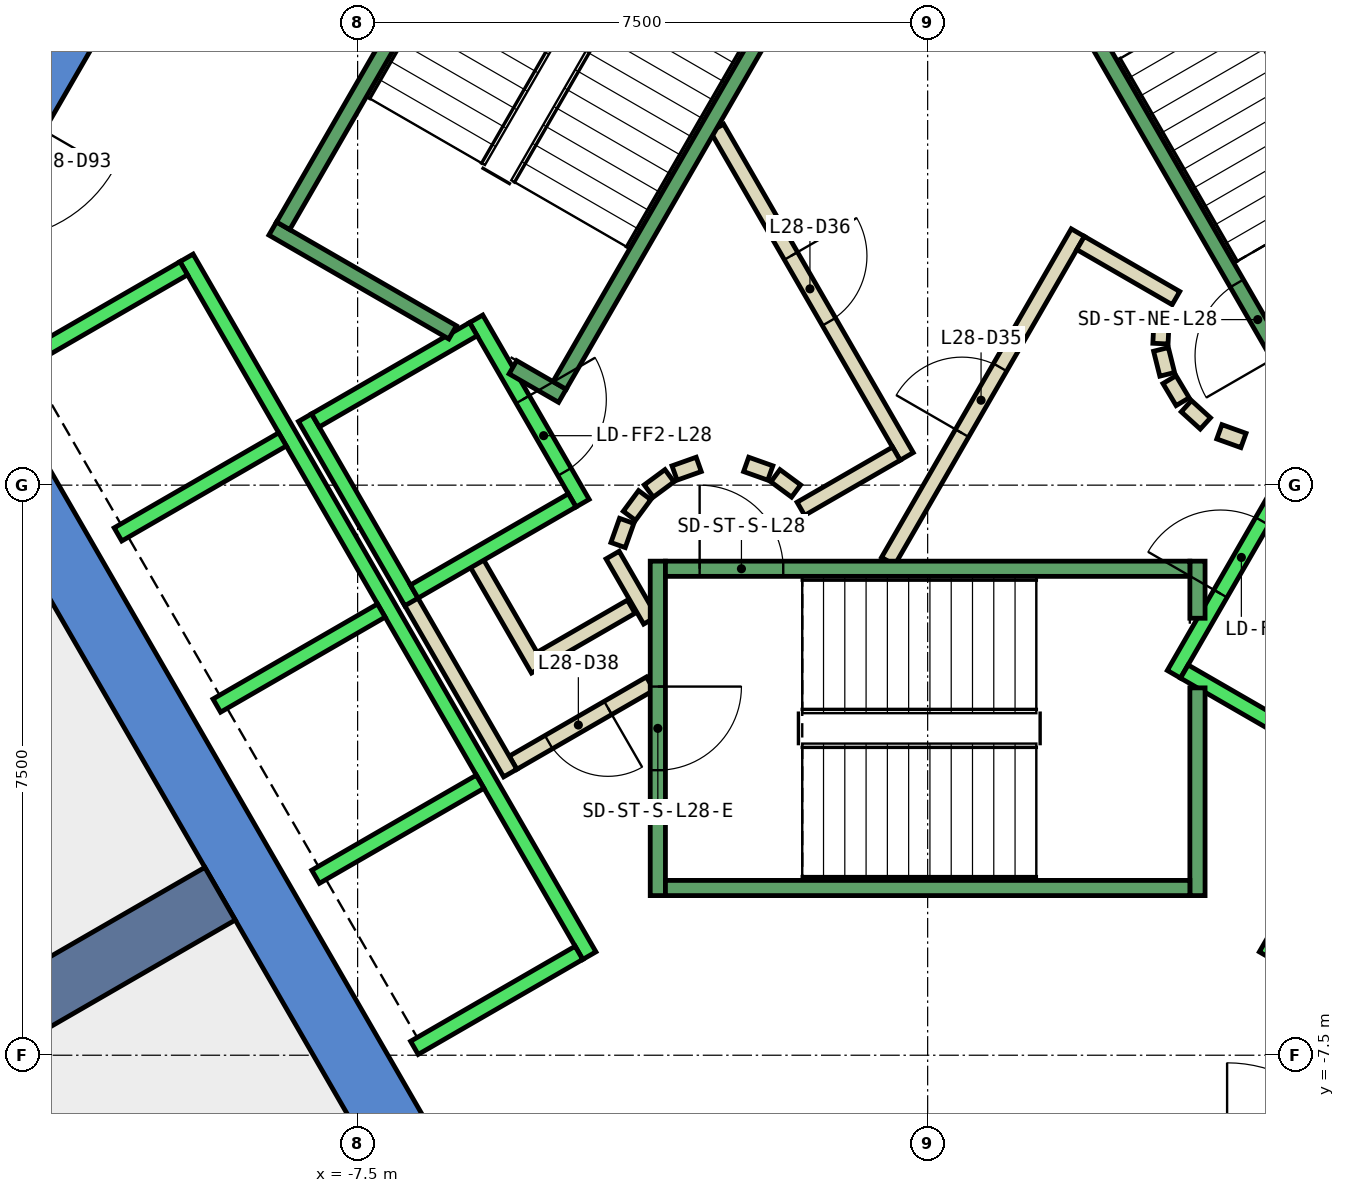
"""IFC4 building model, lengths in metres.
Left out: names, types, materials, properties, quantities, classifications, styles, units other than length and angle.
Written with IfcOpenShell. Run it as: python <this file> out.ifc"""

import sys

from ifc_helpers import new_model, si_unit, direction, frame, frame_2d, origin, place, context, subcontext, project, spatial, polyline, rectangle, outline, extrude, element, fill, save


model = new_model("IFC4")
c1 = context("Model", 3, precision=1e-05, world=origin(), true_north=direction((0.0, 1.0)))
c2 = subcontext(c1, "Body", "Model", "MODEL_VIEW")
j1 = project(units=[si_unit("LENGTHUNIT", "METRE"), si_unit("PLANEANGLEUNIT", "RADIAN")], contexts=[c1])
p1 = place(None, origin())
s1 = spatial("IfcSite", under=j1, at=p1, CompositionType="ELEMENT")
p2 = place(p1, origin())
s2 = spatial("IfcBuilding", under=s1, at=p2, CompositionType="ELEMENT")
p3 = place(p2, frame((0.0, 0.0, 128.6)))
s3 = spatial("IfcBuildingStorey", under=s2, at=p3, CompositionType="ELEMENT", Elevation=128.6)
p4 = place(p3, frame((0.0, 0.0, -0.4)))
e1 = element("IfcWall", 1, at=p4, inside=s3, PredefinedType="SHEAR", context=c2, shape_type="SweptSolid", body=[
    extrude(outline(polyline([(-12.267, 5.252), (-11.531, 4.827), (-6.437, 13.65), (-6.928, 14.5), (-12.267, 5.252)])), origin(), (0.0, 0.0, 1.0), 4.0),
])
p5 = place(p3, frame((0.0, 0.0, -0.4)))
e2 = element("IfcWall", 2, at=p5, inside=s3, PredefinedType="SHEAR", context=c2, shape_type="SweptSolid", body=[
    extrude(outline(polyline([(-13.856, 2.5), (-6.928, -9.5), (-6.437, -8.65), (-12.875, 2.5), (-13.856, 2.5)])), origin(), (0.0, 0.0, 1.0), 4.0),
])
p6 = place(p3, frame((-9.31, -5.375, -0.4), z_axis=(0.0, 0.0, 1.0), x_axis=(-0.866017533419, -0.500013631625, 0.0)))
e3 = element("IfcWall", 3, at=p6, inside=s3, PredefinedType="SHEAR", context=c2, shape_type="SweptSolid", body=[
    extrude(rectangle(XDim=9.0, YDim=0.8, at=frame_2d((4.5, 0.0))), origin(), (0.0, 0.0, 1.0), 4.0),
])
p7 = place(p3, frame((-3.9, -1.599, 0.0), z_axis=(0.0, 0.0, 1.0), x_axis=(-0.865969445389, -0.500096910261, 0.0)))
e4 = element("IfcWall", 4, at=p7, inside=s3, PredefinedType="PARTITIONING", context=c2, shape_type="SweptSolid", body=[
    extrude(rectangle(XDim=1.373, YDim=0.2, at=frame_2d((0.687, 0.0))), origin(), (0.0, 0.0, 1.0), 3.6),
])
p8 = place(p3, frame((-5.126, -2.422, 0.0), z_axis=(0.0, 0.0, 1.0), x_axis=(-0.500062241894, 0.865989465428, 0.0)))
e5 = element("IfcWall", 5, at=p8, inside=s3, PredefinedType="PARTITIONING", context=c2, shape_type="SweptSolid", body=[
    extrude(rectangle(XDim=1.7, YDim=0.2, at=frame_2d((0.85, 0.0))), origin(), (0.0, 0.0, 1.0), 3.6),
])
p9 = place(p3, frame((-3.65, -2.61, 0.0), z_axis=(0.0, 0.0, 1.0), x_axis=(-0.866072462134, -0.499918483688, 0.0)))
e6 = element("IfcWall", 6, at=p9, inside=s3, PredefinedType="PARTITIONING", context=c2, shape_type="SweptSolid", body=[
    extrude(rectangle(XDim=2.084, YDim=0.2, at=frame_2d((1.042, 0.0))), origin(), (0.0, 0.0, 1.0), 3.6),
])
p10 = place(p9, frame((0.642, 0.0, 0.0)))
e7 = element("IfcOpeningElement", 7, at=p10, cuts=e6, PredefinedType="OPENING", context=c2, shape_type="SweptSolid", body=[
    extrude(rectangle(XDim=0.9, YDim=2.1, at=frame_2d((0.45, 1.05))), frame((0.0, 0.11, 0.0), z_axis=(0.0, -1.0, 0.0), x_axis=(1.0, 0.0, 0.0)), (0.0, 0.0, 1.0), 0.22),
])
p11 = place(p3, frame((-5.492, -3.788, 0.0), z_axis=(0.0, 0.0, 1.0), x_axis=(-0.500008949224, 0.866020236886, 0.0)))
e8 = element("IfcWall", 8, at=p11, inside=s3, PredefinedType="PARTITIONING", context=c2, shape_type="SweptSolid", body=[
    extrude(rectangle(XDim=2.68, YDim=0.2, at=frame_2d((1.34, 0.0))), origin(), (0.0, 0.0, 1.0), 3.6),
])
p12 = place(p3, frame((-4.145, -0.92, 0.0), z_axis=(0.0, 0.0, 1.0), x_axis=(0.499743786207, -0.866173278362, 0.0)))
e9 = element("IfcWall", 9, at=p12, inside=s3, PredefinedType="PARTITIONING", context=c2, shape_type="SweptSolid", body=[
    extrude(rectangle(XDim=0.991, YDim=0.2, at=frame_2d((0.495, 0.0))), origin(), (0.0, 0.0, 1.0), 3.6),
])
p13 = place(p3, frame((-0.52, -1.0, 0.0), z_axis=(0.0, 0.0, 1.0), x_axis=(0.50011622646, 0.865958290007, 0.0)))
e10 = element("IfcWall", 10, at=p13, inside=s3, PredefinedType="PARTITIONING", context=c2, shape_type="SweptSolid", body=[
    extrude(rectangle(XDim=4.991, YDim=0.2, at=frame_2d((2.496, 0.0))), origin(), (0.0, 0.0, 1.0), 3.6),
])
p14 = place(p13, frame((1.945, 0.0, 0.0)))
e11 = element("IfcOpeningElement", 11, at=p14, cuts=e10, PredefinedType="OPENING", context=c2, shape_type="SweptSolid", body=[
    extrude(rectangle(XDim=1.0, YDim=2.1, at=frame_2d((0.5, 1.05))), frame((0.0, 0.11, 0.0), z_axis=(0.0, -1.0, 0.0), x_axis=(1.0, 0.0, 0.0)), (0.0, 0.0, 1.0), 0.22),
])
p15 = place(p3, frame((2.012, 3.186, 0.0), z_axis=(0.0, 0.0, 1.0), x_axis=(0.865891012941, -0.500232699559, 0.0)))
e12 = element("IfcWall", 12, at=p15, inside=s3, PredefinedType="PARTITIONING", context=c2, shape_type="SweptSolid", body=[
    extrude(rectangle(XDim=1.449, YDim=0.2, at=frame_2d((0.725, 0.0))), origin(), (0.0, 0.0, 1.0), 3.6),
])
p16 = place(p3, frame((3.079, 2.199, 0.0), z_axis=(0.0, 0.0, 1.0), x_axis=(-0.047771483479, -0.998858290933, 0.0)))
e13 = element("IfcWall", 13, at=p16, inside=s3, PredefinedType="PARTITIONING", context=c2, shape_type="SweptSolid", body=[
    extrude(rectangle(XDim=0.337, YDim=0.2, at=frame_2d((0.169, 0.0))), origin(), (0.0, 0.0, 1.0), 3.6),
])
p17 = place(p3, frame((3.07, 1.786, 0.0), z_axis=(0.0, 0.0, 1.0), x_axis=(0.242705583207, -0.970099994784, 0.0)))
e14 = element("IfcWall", 14, at=p17, inside=s3, PredefinedType="PARTITIONING", context=c2, shape_type="SweptSolid", body=[
    extrude(rectangle(XDim=0.338, YDim=0.2, at=frame_2d((0.169, 0.0))), origin(), (0.0, 0.0, 1.0), 3.6),
])
for number, where, z_axis, x_axis in (
    (15, (3.182, 1.388, 0.0), (0.0, 0.0, 1.0), (0.512, -0.859, 0.0)),
    (16, (3.404, 1.039, 0.0), (0.0, 0.0, 1.0), (0.74, -0.672, 0.0)),
):
    element("IfcWall", number, at=place(p3, frame(where, z_axis=z_axis, x_axis=x_axis)), inside=s3, PredefinedType="PARTITIONING", context=c2, shape_type="SweptSolid", body=[
        extrude(rectangle(XDim=0.338, YDim=0.2, at=frame_2d((0.169, 0.0))), origin(), (0.0, 0.0, 1.0), 3.6),
    ])
p18 = place(p3, frame((3.838, 0.702, 0.0), z_axis=(0.0, 0.0, 1.0), x_axis=(0.941035081519, -0.338308993895, 0.0)))
e17 = element("IfcWall", 17, at=p18, inside=s3, PredefinedType="PARTITIONING", context=c2, shape_type="SweptSolid", body=[
    extrude(rectangle(XDim=0.337, YDim=0.2, at=frame_2d((0.168, 0.0))), origin(), (0.0, 0.0, 1.0), 3.6),
])
p19 = place(p3, frame((-2.771, 4.7, 0.0), z_axis=(0.0, 0.0, 1.0), x_axis=(0.499969479948, -0.866043023828, 0.0)))
e18 = element("IfcWall", 18, at=p19, inside=s3, PredefinedType="PARTITIONING", context=c2, shape_type="SweptSolid", body=[
    extrude(rectangle(XDim=4.99, YDim=0.2, at=frame_2d((2.495, 0.0))), origin(), (0.0, 0.0, 1.0), 3.6),
])
p20 = place(p19, frame((1.945, 0.0, 0.0)))
e19 = element("IfcOpeningElement", 19, at=p20, cuts=e18, PredefinedType="OPENING", context=c2, shape_type="SweptSolid", body=[
    extrude(rectangle(XDim=1.0, YDim=2.1, at=frame_2d((0.5, 1.05))), frame((0.0, 0.11, 0.0), z_axis=(0.0, -1.0, 0.0), x_axis=(1.0, 0.0, 0.0)), (0.0, 0.0, 1.0), 0.22),
])
p21 = place(p3, frame((-0.412, 0.414, 0.0), z_axis=(0.0, 0.0, 1.0), x_axis=(-0.866017369001, -0.500013916395, 0.0)))
e20 = element("IfcWall", 20, at=p21, inside=s3, PredefinedType="PARTITIONING", context=c2, shape_type="SweptSolid", body=[
    extrude(rectangle(XDim=1.45, YDim=0.2, at=frame_2d((0.725, 0.0))), origin(), (0.0, 0.0, 1.0), 3.6),
])
p22 = place(p3, frame((-1.731, -0.077, 0.0), z_axis=(0.0, 0.0, 1.0), x_axis=(-0.804311165252, 0.594208338422, 0.0)))
e21 = element("IfcWall", 21, at=p22, inside=s3, PredefinedType="PARTITIONING", context=c2, shape_type="SweptSolid", body=[
    extrude(rectangle(XDim=0.338, YDim=0.2, at=frame_2d((0.169, 0.0))), origin(), (0.0, 0.0, 1.0), 3.6),
])
p23 = place(p3, frame((-2.07, 0.16, 0.0), z_axis=(0.0, 0.0, 1.0), x_axis=(-0.942199461132, 0.335052496547, 0.0)))
e22 = element("IfcWall", 22, at=p23, inside=s3, PredefinedType="PARTITIONING", context=c2, shape_type="SweptSolid", body=[
    extrude(rectangle(XDim=0.337, YDim=0.2, at=frame_2d((0.169, 0.0))), origin(), (0.0, 0.0, 1.0), 3.6),
])
p24 = place(p3, frame((-3.012, 0.273, 0.0), z_axis=(0.0, 0.0, 1.0), x_axis=(-0.942280615813, -0.334824194261, 0.0)))
e23 = element("IfcWall", 23, at=p24, inside=s3, PredefinedType="PARTITIONING", context=c2, shape_type="SweptSolid", body=[
    extrude(rectangle(XDim=0.338, YDim=0.2, at=frame_2d((0.169, 0.0))), origin(), (0.0, 0.0, 1.0), 3.6),
])
p25 = place(p3, frame((-3.397, 0.124, 0.0), z_axis=(0.0, 0.0, 1.0), x_axis=(-0.804311165252, -0.594208338422, 0.0)))
e24 = element("IfcWall", 24, at=p25, inside=s3, PredefinedType="PARTITIONING", context=c2, shape_type="SweptSolid", body=[
    extrude(rectangle(XDim=0.338, YDim=0.2, at=frame_2d((0.169, 0.0))), origin(), (0.0, 0.0, 1.0), 3.6),
])
p26 = place(p3, frame((-3.723, -0.131, 0.0), z_axis=(0.0, 0.0, 1.0), x_axis=(-0.594675113454, -0.803966112121, 0.0)))
e25 = element("IfcWall", 25, at=p26, inside=s3, PredefinedType="PARTITIONING", context=c2, shape_type="SweptSolid", body=[
    extrude(rectangle(XDim=0.338, YDim=0.2, at=frame_2d((0.169, 0.0))), origin(), (0.0, 0.0, 1.0), 3.6),
])
p27 = place(p3, frame((-3.96, -0.47, 0.0), z_axis=(0.0, 0.0, 1.0), x_axis=(-0.334824194261, -0.942280615813, 0.0)))
e26 = element("IfcWall", 26, at=p27, inside=s3, PredefinedType="PARTITIONING", context=c2, shape_type="SweptSolid", body=[
    extrude(rectangle(XDim=0.338, YDim=0.2, at=frame_2d((0.169, 0.0))), origin(), (0.0, 0.0, 1.0), 3.6),
])
p28 = place(p3, frame((-5.94, 2.188, 0.0), z_axis=(0.0, 0.0, 1.0), x_axis=(0.49994636267, -0.866056369097, 0.0)))
e27 = element("IfcWall", 27, at=p28, inside=s3, PredefinedType="STANDARD", context=c2, shape_type="SweptSolid", body=[
    extrude(rectangle(XDim=2.8, YDim=0.2, at=frame_2d((1.4, 0.0))), origin(), (0.0, 0.0, 1.0), 3.6),
])
p29 = place(p28, frame((1.225, 0.0, 0.0)))
e28 = element("IfcOpeningElement", 28, at=p29, cuts=e27, PredefinedType="OPENING", context=c2, shape_type="SweptSolid", body=[
    extrude(rectangle(XDim=1.1, YDim=2.1, at=frame_2d((0.55, 1.05))), frame((0.0, 0.11, 0.0), z_axis=(0.0, -1.0, 0.0), x_axis=(1.0, 0.0, 0.0)), (0.0, 0.0, 1.0), 0.22),
])
p30 = place(p3, frame((-8.192, 0.888, 0.0), z_axis=(0.0, 0.0, 1.0), x_axis=(0.49994636267, -0.866056369097, 0.0)))
e29 = element("IfcWall", 29, at=p30, inside=s3, PredefinedType="STANDARD", context=c2, shape_type="SweptSolid", body=[
    extrude(rectangle(XDim=2.8, YDim=0.2, at=frame_2d((1.4, 0.0))), origin(), (0.0, 0.0, 1.0), 3.6),
])
for number, where, z_axis, x_axis in (
    (30, (-5.977, 2.052, 0.0), (0.0, 0.0, 1.0), (-0.866, -0.5, 0.0)),
    (31, (-4.677, -0.2, 0.0), (0.0, 0.0, 1.0), (-0.866, -0.5, 0.0)),
):
    element("IfcWall", number, at=place(p3, frame(where, z_axis=z_axis, x_axis=x_axis)), inside=s3, PredefinedType="STANDARD", context=c2, shape_type="SweptSolid", body=[
        extrude(rectangle(XDim=2.399, YDim=0.2, at=frame_2d((1.2, 0.0))), origin(), (0.0, 0.0, 1.0), 3.6),
    ])
p31 = place(p3, frame((-9.751, 2.99, 0.0), z_axis=(0.0, 0.0, 1.0), x_axis=(0.50000090737, -0.866024879913, 0.0)))
e32 = element("IfcWall", 32, at=p31, inside=s3, PredefinedType="STANDARD", context=c2, shape_type="SweptSolid", body=[
    extrude(rectangle(XDim=10.6, YDim=0.2, at=frame_2d((5.3, 0.0))), origin(), (0.0, 0.0, 1.0), 3.6),
])
p32 = place(p3, frame((-9.788, 2.853, 0.0), z_axis=(0.0, 0.0, 1.0), x_axis=(-0.865998541277, -0.500046524342, 0.0)))
e33 = element("IfcWall", 33, at=p32, inside=s3, PredefinedType="STANDARD", context=c2, shape_type="SweptSolid", body=[
    extrude(rectangle(XDim=2.5, YDim=0.2, at=frame_2d((1.25, 0.0))), origin(), (0.0, 0.0, 1.0), 3.6),
])
for number, where, z_axis, x_axis in (
    (34, (-8.488, 0.602, 0.0), (0.0, 0.0, 1.0), (-0.866, -0.5, 0.0)),
    (35, (-7.188, -1.65, 0.0), (0.0, 0.0, 1.0), (-0.866, -0.5, 0.0)),
    (36, (-5.888, -3.902, 0.0), (0.0, 0.0, 1.0), (-0.866, -0.5, 0.0)),
    (37, (-4.588, -6.153, 0.0), (0.0, 0.0, 1.0), (-0.866, -0.5, 0.0)),
):
    element("IfcWall", number, at=place(p3, frame(where, z_axis=z_axis, x_axis=x_axis)), inside=s3, PredefinedType="STANDARD", context=c2, shape_type="SweptSolid", body=[
        extrude(rectangle(XDim=2.5, YDim=0.2, at=frame_2d((1.25, 0.0))), origin(), (0.0, 0.0, 1.0), 3.6),
    ])
p33 = place(p3, frame((3.24, -2.488, 0.0), z_axis=(0.0, 0.0, 1.0), x_axis=(0.49994636267, 0.866056369097, 0.0)))
e38 = element("IfcWall", 38, at=p33, inside=s3, PredefinedType="STANDARD", context=c2, shape_type="SweptSolid", body=[
    extrude(rectangle(XDim=2.8, YDim=0.2, at=frame_2d((1.4, 0.0))), origin(), (0.0, 0.0, 1.0), 3.6),
])
p34 = place(p33, frame((1.225, 0.0, 0.0)))
e39 = element("IfcOpeningElement", 39, at=p34, cuts=e38, PredefinedType="OPENING", context=c2, shape_type="SweptSolid", body=[
    extrude(rectangle(XDim=1.1, YDim=2.1, at=frame_2d((0.55, 1.05))), frame((0.0, 0.11, 0.0), z_axis=(0.0, -1.0, 0.0), x_axis=(1.0, 0.0, 0.0)), (0.0, 0.0, 1.0), 0.22),
])
p35 = place(p3, frame((3.377, -2.452, 0.0), z_axis=(0.0, 0.0, 1.0), x_axis=(0.865955154139, -0.50012165622, 0.0)))
e40 = element("IfcWall", 40, at=p35, inside=s3, PredefinedType="STANDARD", context=c2, shape_type="SweptSolid", body=[
    extrude(rectangle(XDim=2.4, YDim=0.2, at=frame_2d((1.2, 0.0))), origin(), (0.0, 0.0, 1.0), 3.6),
])
p36 = place(p3, frame((4.451, -6.19, 0.0), z_axis=(0.0, 0.0, 1.0), x_axis=(0.50000090737, 0.866024879913, 0.0)))
e41 = element("IfcWall", 41, at=p36, inside=s3, PredefinedType="STANDARD", context=c2, shape_type="SweptSolid", body=[
    extrude(rectangle(XDim=10.6, YDim=0.2, at=frame_2d((5.3, 0.0))), origin(), (0.0, 0.0, 1.0), 3.6),
])
p37 = place(p3, frame((-3.55, -1.0, 0.0), z_axis=(0.0, 0.0, 1.0), x_axis=(0.0, -1.0, 0.0)))
e42 = element("IfcWall", 42, at=p37, inside=s3, PredefinedType="STANDARD", context=c2, shape_type="SweptSolid", body=[
    extrude(rectangle(XDim=4.4, YDim=0.2, at=frame_2d((2.2, 0.0))), origin(), (0.0, 0.0, 1.0), 3.6),
])
p38 = place(p37, frame((1.65, 0.0, 0.0)))
e43 = element("IfcOpeningElement", 43, at=p38, cuts=e42, PredefinedType="OPENING", context=c2, shape_type="SweptSolid", body=[
    extrude(rectangle(XDim=1.1, YDim=2.2, at=frame_2d((0.55, 1.1))), frame((0.0, 0.11, 0.0), z_axis=(0.0, -1.0, 0.0), x_axis=(1.0, 0.0, 0.0)), (0.0, 0.0, 1.0), 0.22),
])
p39 = place(p3, frame((3.55, -2.667, 0.0), z_axis=(0.0, 0.0, 1.0), x_axis=(0.0, -1.0, 0.0)))
e44 = element("IfcWall", 44, at=p39, inside=s3, PredefinedType="STANDARD", context=c2, shape_type="SweptSolid", body=[
    extrude(rectangle(XDim=2.733, YDim=0.2, at=frame_2d((1.366, 0.0))), origin(), (0.0, 0.0, 1.0), 3.6),
])
p40 = place(p3, frame((3.55, -1.0, 0.0), z_axis=(0.0, 0.0, 1.0), x_axis=(0.0, -1.0, 0.0)))
e45 = element("IfcWall", 45, at=p40, inside=s3, PredefinedType="STANDARD", context=c2, shape_type="SweptSolid", body=[
    extrude(rectangle(XDim=0.751, YDim=0.2, at=frame_2d((0.375, 0.0))), origin(), (0.0, 0.0, 1.0), 3.6),
])
p41 = place(p3, frame((-3.45, -1.1, 0.0), z_axis=(0.0, 0.0, 1.0), x_axis=(1.0, 0.0, 0.0)))
e46 = element("IfcWall", 46, at=p41, inside=s3, PredefinedType="STANDARD", context=c2, shape_type="SweptSolid", body=[
    extrude(rectangle(XDim=6.9, YDim=0.2, at=frame_2d((3.45, 0.0))), origin(), (0.0, 0.0, 1.0), 3.6),
])
p42 = place(p41, frame((0.45, 0.0, 0.0)))
e47 = element("IfcOpeningElement", 47, at=p42, cuts=e46, PredefinedType="OPENING", context=c2, shape_type="SweptSolid", body=[
    extrude(rectangle(XDim=1.1, YDim=2.2, at=frame_2d((0.55, 1.1))), frame((0.0, 0.11, 0.0), z_axis=(0.0, -1.0, 0.0), x_axis=(1.0, 0.0, 0.0)), (0.0, 0.0, 1.0), 0.22),
])
p43 = place(p3, frame((-3.45, -5.3, 0.0), z_axis=(0.0, 0.0, 1.0), x_axis=(1.0, 0.0, 0.0)))
e48 = element("IfcWall", 48, at=p43, inside=s3, PredefinedType="STANDARD", context=c2, shape_type="SweptSolid", body=[
    extrude(rectangle(XDim=6.9, YDim=0.2, at=frame_2d((3.45, 0.0))), origin(), (0.0, 0.0, 1.0), 3.6),
])
p44 = place(p3, frame((4.843, 1.312, 0.0), z_axis=(0.0, 0.0, 1.0), x_axis=(-0.499963383562, 0.866046543262, 0.0)))
e49 = element("IfcWall", 49, at=p44, inside=s3, PredefinedType="STANDARD", context=c2, shape_type="SweptSolid", body=[
    extrude(rectangle(XDim=6.9, YDim=0.2, at=frame_2d((3.45, 0.0))), origin(), (0.0, 0.0, 1.0), 3.6),
])
p45 = place(p44, frame((0.45, 0.0, 0.0)))
e50 = element("IfcOpeningElement", 50, at=p45, cuts=e49, PredefinedType="OPENING", context=c2, shape_type="SweptSolid", body=[
    extrude(rectangle(XDim=1.1, YDim=2.2, at=frame_2d((0.55, 1.1))), frame((0.0, 0.11, 0.0), z_axis=(0.0, -1.0, 0.0), x_axis=(1.0, 0.0, 0.0)), (0.0, 0.0, 1.0), 0.22),
])
p46 = place(p3, frame((-6.25, 2.01, 0.0), z_axis=(0.0, 0.0, 1.0), x_axis=(-0.86611865017, 0.499838457731, 0.0)))
e51 = element("IfcWall", 51, at=p46, inside=s3, PredefinedType="STANDARD", context=c2, shape_type="SweptSolid", body=[
    extrude(rectangle(XDim=2.733, YDim=0.2, at=frame_2d((1.366, 0.0))), origin(), (0.0, 0.0, 1.0), 3.6),
])
p47 = place(p3, frame((-4.806, 1.176, 0.0), z_axis=(0.0, 0.0, 1.0), x_axis=(-0.866558586415, 0.499075361355, 0.0)))
e52 = element("IfcWall", 52, at=p47, inside=s3, PredefinedType="STANDARD", context=c2, shape_type="SweptSolid", body=[
    extrude(rectangle(XDim=0.751, YDim=0.2, at=frame_2d((0.376, 0.0))), origin(), (0.0, 0.0, 1.0), 3.6),
])
p48 = place(p3, frame((-1.393, 7.288, 0.0), z_axis=(0.0, 0.0, 1.0), x_axis=(-0.499963383562, -0.866046543262, 0.0)))
e53 = element("IfcWall", 53, at=p48, inside=s3, PredefinedType="STANDARD", context=c2, shape_type="SweptSolid", body=[
    extrude(rectangle(XDim=6.9, YDim=0.2, at=frame_2d((3.45, 0.0))), origin(), (0.0, 0.0, 1.0), 3.6),
])
p49 = place(p48, frame((0.45, 0.0, 0.0)))
e54 = element("IfcOpeningElement", 54, at=p49, cuts=e53, PredefinedType="OPENING", context=c2, shape_type="SweptSolid", body=[
    extrude(rectangle(XDim=1.1, YDim=2.2, at=frame_2d((0.55, 1.1))), frame((0.0, 0.11, 0.0), z_axis=(0.0, -1.0, 0.0), x_axis=(1.0, 0.0, 0.0)), (0.0, 0.0, 1.0), 0.22),
])
p50 = place(p3, frame((-5.03, 9.388, 0.0), z_axis=(0.0, 0.0, 1.0), x_axis=(-0.499978703459, -0.866037698999, 0.0)))
e55 = element("IfcWall", 55, at=p50, inside=s3, PredefinedType="STANDARD", context=c2, shape_type="SweptSolid", body=[
    extrude(rectangle(XDim=6.9, YDim=0.2, at=frame_2d((3.45, 0.0))), origin(), (0.0, 0.0, 1.0), 3.6),
])
p51 = place(p14, origin())
e56 = element("IfcDoor", 56, at=p51, inside=s3, OperationType="SINGLE_SWING_LEFT", PredefinedType="DOOR", context=c2, shape_type="SweptSolid", body=[
    extrude(rectangle(XDim=1.0, YDim=2.1, at=frame_2d((0.5, 1.05))), frame((0.0, 0.025, 0.0), z_axis=(0.0, -1.0, 0.0), x_axis=(1.0, 0.0, 0.0)), (0.0, 0.0, 1.0), 0.05),
])
fill(e11, e56)
p52 = place(p20, origin())
e57 = element("IfcDoor", 57, at=p52, inside=s3, OperationType="SINGLE_SWING_RIGHT", PredefinedType="DOOR", context=c2, shape_type="SweptSolid", body=[
    extrude(rectangle(XDim=1.0, YDim=2.1, at=frame_2d((0.5, 1.05))), frame((0.0, 0.025, 0.0), z_axis=(0.0, -1.0, 0.0), x_axis=(1.0, 0.0, 0.0)), (0.0, 0.0, 1.0), 0.05),
])
fill(e19, e57)
p53 = place(p10, origin())
e58 = element("IfcDoor", 58, at=p53, inside=s3, OperationType="SINGLE_SWING_LEFT", PredefinedType="DOOR", context=c2, shape_type="SweptSolid", body=[
    extrude(rectangle(XDim=0.9, YDim=2.1, at=frame_2d((0.45, 1.05))), frame((0.0, 0.025, 0.0), z_axis=(0.0, -1.0, 0.0), x_axis=(1.0, 0.0, 0.0)), (0.0, 0.0, 1.0), 0.05),
])
fill(e7, e58)
p54 = place(p34, origin())
e59 = element("IfcDoor", 59, at=p54, inside=s3, OperationType="SLIDING_TO_LEFT", PredefinedType="DOOR", context=c2, shape_type="SweptSolid", body=[
    extrude(rectangle(XDim=1.1, YDim=2.1, at=frame_2d((0.55, 1.05))), frame((0.0, 0.025, 0.0), z_axis=(0.0, -1.0, 0.0), x_axis=(1.0, 0.0, 0.0)), (0.0, 0.0, 1.0), 0.05),
])
fill(e39, e59)
p55 = place(p29, origin())
e60 = element("IfcDoor", 60, at=p55, inside=s3, OperationType="SLIDING_TO_LEFT", PredefinedType="DOOR", context=c2, shape_type="SweptSolid", body=[
    extrude(rectangle(XDim=1.1, YDim=2.1, at=frame_2d((0.55, 1.05))), frame((0.0, 0.025, 0.0), z_axis=(0.0, -1.0, 0.0), x_axis=(1.0, 0.0, 0.0)), (0.0, 0.0, 1.0), 0.05),
])
fill(e28, e60)
p56 = place(p42, origin())
e61 = element("IfcDoor", 61, at=p56, inside=s3, OperationType="SINGLE_SWING_LEFT", PredefinedType="DOOR", context=c2, shape_type="SweptSolid", body=[
    extrude(rectangle(XDim=1.1, YDim=2.2, at=frame_2d((0.55, 1.1))), frame((0.0, 0.025, 0.0), z_axis=(0.0, -1.0, 0.0), x_axis=(1.0, 0.0, 0.0)), (0.0, 0.0, 1.0), 0.05),
])
fill(e47, e61)
p57 = place(p38, origin())
e62 = element("IfcDoor", 62, at=p57, inside=s3, OperationType="SINGLE_SWING_LEFT", PredefinedType="DOOR", context=c2, shape_type="SweptSolid", body=[
    extrude(rectangle(XDim=1.1, YDim=2.2, at=frame_2d((0.55, 1.1))), frame((0.0, 0.025, 0.0), z_axis=(0.0, -1.0, 0.0), x_axis=(1.0, 0.0, 0.0)), (0.0, 0.0, 1.0), 0.05),
])
fill(e43, e62)
p58 = place(p45, origin())
e63 = element("IfcDoor", 63, at=p58, inside=s3, OperationType="SINGLE_SWING_LEFT", PredefinedType="DOOR", context=c2, shape_type="SweptSolid", body=[
    extrude(rectangle(XDim=1.1, YDim=2.2, at=frame_2d((0.55, 1.1))), frame((0.0, 0.025, 0.0), z_axis=(0.0, -1.0, 0.0), x_axis=(1.0, 0.0, 0.0)), (0.0, 0.0, 1.0), 0.05),
])
fill(e50, e63)
save(model, sys.argv[1])
